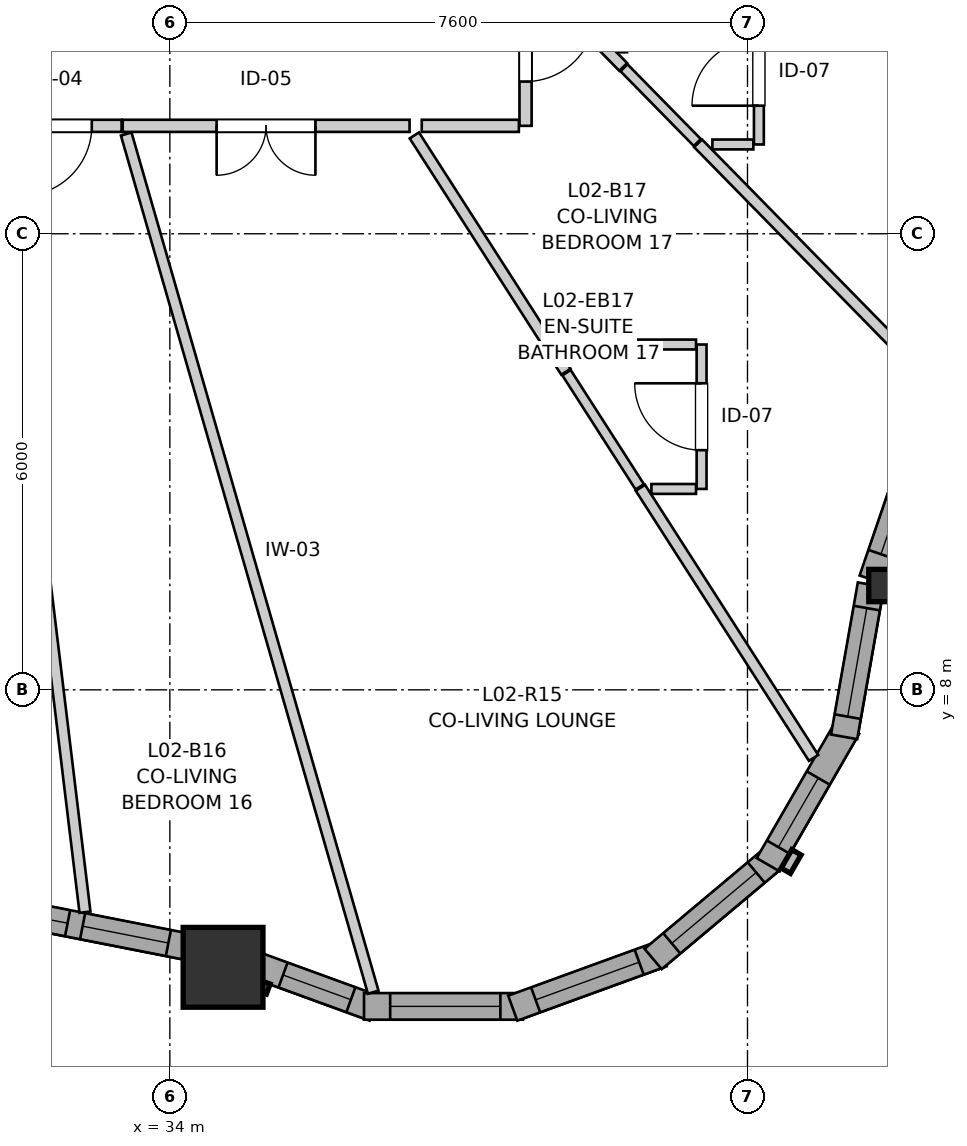
"""IFC4 building model, lengths in metres.
Left out: names, types, materials, properties, quantities, classifications, styles, units other than length and angle.
Written with IfcOpenShell. Run it as: python <this file> out.ifc"""

import sys

from ifc_helpers import new_model, si_unit, direction, frame, frame_2d, origin, origin_2d, place, context, subcontext, project, spatial, rectangle, i_section, extrude, source, transform, mapped, element, fill, save


model = new_model("IFC4")
c1 = context("Model", 3, precision=1e-05, world=origin(), true_north=direction((0.0, 1.0)))
c2 = subcontext(c1, "Body", "Model", "MODEL_VIEW")
j1 = project(units=[si_unit("LENGTHUNIT", "METRE"), si_unit("PLANEANGLEUNIT", "RADIAN")], contexts=[c1])
p1 = place(None, origin())
s1 = spatial("IfcSite", under=j1, at=p1, CompositionType="ELEMENT")
p2 = place(p1, origin())
s2 = spatial("IfcBuilding", under=s1, at=p2, CompositionType="ELEMENT")
p3 = place(p2, frame((0.0, 0.0, 11.0)))
s3 = spatial("IfcBuildingStorey", under=s2, at=p3, CompositionType="ELEMENT", Elevation=11.0)
m1 = source(origin(), c2, "Body", "SweptSolid", [
    extrude(rectangle(XDim=1.05, YDim=1.05, at=origin_2d()), origin(), (0.0, 0.0, 1.0), 2.94),
])
p4 = place(p3, frame((34.7, 4.349, 0.0), z_axis=(0.0, 0.0, 1.0), x_axis=(1.0, 0.0, 0.0)))
e1 = element("IfcColumn", 1, at=p4, inside=s3, PredefinedType="COLUMN", context=c2, shape_type="MappedRepresentation", body=[
    mapped(m1, transform((0.0, 0.0, 0.0), x_axis=(1.0, 0.0, 0.0), y_axis=(0.0, 1.0, 0.0), z_axis=(0.0, 0.0, 1.0), scale=1.0)),
])
m2 = source(origin(), c2, "Body", "SweptSolid", [
    extrude(i_section(OverallWidth=0.409, OverallDepth=0.425, WebThickness=0.03, FlangeThickness=0.048, FilletRadius=0.015, at=origin_2d()), origin(), (0.0, 0.0, 1.0), 2.94),
])
p5 = place(p3, frame((43.4, 9.372, 0.0), z_axis=(0.0, 0.0, 1.0), x_axis=(1.0, 0.0, 0.0)))
e2 = element("IfcColumn", 2, at=p5, inside=s3, PredefinedType="PILASTER", context=c2, shape_type="MappedRepresentation", body=[
    mapped(m2, transform((0.0, 0.0, 0.0), x_axis=(1.0, 0.0, 0.0), y_axis=(0.0, 1.0, 0.0), z_axis=(0.0, 0.0, 1.0), scale=1.0)),
])
p6 = place(p3, frame((31.248, 5.206, 0.0), z_axis=(0.0, 0.0, 1.0), x_axis=(0.981233354077, -0.192824025597, 0.0)))
e3 = element("IfcWall", 3, at=p6, inside=s3, PredefinedType="SOLIDWALL", context=c2, shape_type="SweptSolid", body=[
    extrude(rectangle(XDim=3.253, YDim=0.35, at=frame_2d((1.626, 0.0))), origin(), (0.0, 0.0, 1.0), 2.42),
])
p7 = place(p6, frame((0.284, 0.0, 0.82)))
e4 = element("IfcOpeningElement", 4, at=p7, cuts=e3, PredefinedType="OPENING", context=c2, shape_type="SweptSolid", body=[
    extrude(rectangle(XDim=1.15, YDim=1.2, at=frame_2d((0.575, 0.6))), frame((0.0, 0.185, 0.0), z_axis=(0.0, -1.0, 0.0), x_axis=(1.0, 0.0, 0.0)), (0.0, 0.0, 1.0), 0.37),
])
p8 = place(p6, frame((1.635, 0.0, 0.82)))
e5 = element("IfcOpeningElement", 5, at=p8, cuts=e3, PredefinedType="OPENING", context=c2, shape_type="SweptSolid", body=[
    extrude(rectangle(XDim=1.15, YDim=1.2, at=frame_2d((0.575, 0.6))), frame((0.0, 0.185, 0.0), z_axis=(0.0, -1.0, 0.0), x_axis=(1.0, 0.0, 0.0)), (0.0, 0.0, 1.0), 0.37),
])
p9 = place(p3, frame((35.042, 4.411, 0.0), z_axis=(0.0, 0.0, 1.0), x_axis=(0.9396916908, -0.34202269843, 0.0)))
e6 = element("IfcWall", 6, at=p9, inside=s3, PredefinedType="SOLIDWALL", context=c2, shape_type="SweptSolid", body=[
    extrude(rectangle(XDim=1.752, YDim=0.35, at=frame_2d((0.876, 0.0))), origin(), (0.0, 0.0, 1.0), 2.42),
])
p10 = place(p9, frame((0.476, 0.0, 0.82)))
e7 = element("IfcOpeningElement", 7, at=p10, cuts=e6, PredefinedType="OPENING", context=c2, shape_type="SweptSolid", body=[
    extrude(rectangle(XDim=0.95, YDim=1.35, at=frame_2d((0.475, 0.675))), frame((0.0, 0.185, 0.0), z_axis=(0.0, -1.0, 0.0), x_axis=(1.0, 0.0, 0.0)), (0.0, 0.0, 1.0), 0.37),
])
p11 = place(p3, frame((36.555, 3.835, 0.0), z_axis=(0.0, 0.0, 1.0), x_axis=(1.0, 0.0, 0.0)))
e8 = element("IfcWall", 8, at=p11, inside=s3, PredefinedType="SOLIDWALL", context=c2, shape_type="SweptSolid", body=[
    extrude(rectangle(XDim=2.091, YDim=0.35, at=frame_2d((1.045, 0.0))), origin(), (0.0, 0.0, 1.0), 2.42),
])
p12 = place(p11, frame((0.344, 0.0, 0.82)))
e9 = element("IfcOpeningElement", 9, at=p12, cuts=e8, PredefinedType="OPENING", context=c2, shape_type="SweptSolid", body=[
    extrude(rectangle(XDim=1.45, YDim=1.25, at=frame_2d((0.725, 0.625))), frame((0.0, 0.185, 0.0), z_axis=(0.0, -1.0, 0.0), x_axis=(1.0, 0.0, 0.0)), (0.0, 0.0, 1.0), 0.37),
])
p13 = place(p3, frame((38.512, 3.812, 0.0), z_axis=(0.0, 0.0, 1.0), x_axis=(0.939660353162, 0.342108784886, 0.0)))
e10 = element("IfcWall", 10, at=p13, inside=s3, PredefinedType="SOLIDWALL", context=c2, shape_type="SweptSolid", body=[
    extrude(rectangle(XDim=2.09, YDim=0.35, at=frame_2d((1.045, 0.0))), origin(), (0.0, 0.0, 1.0), 2.42),
])
p14 = place(p13, frame((0.32, 0.0, 0.82)))
e11 = element("IfcOpeningElement", 11, at=p14, cuts=e10, PredefinedType="OPENING", context=c2, shape_type="SweptSolid", body=[
    extrude(rectangle(XDim=1.45, YDim=1.25, at=frame_2d((0.725, 0.625))), frame((0.0, 0.185, 0.0), z_axis=(0.0, -1.0, 0.0), x_axis=(1.0, 0.0, 0.0)), (0.0, 0.0, 1.0), 0.37),
])
p15 = place(p3, frame((40.358, 4.459, 0.0), z_axis=(0.0, 0.0, 1.0), x_axis=(0.766082082368, 0.642742750308, 0.0)))
e12 = element("IfcWall", 12, at=p15, inside=s3, PredefinedType="SOLIDWALL", context=c2, shape_type="SweptSolid", body=[
    extrude(rectangle(XDim=2.09, YDim=0.35, at=frame_2d((1.045, 0.0))), origin(), (0.0, 0.0, 1.0), 2.42),
])
p16 = place(p15, frame((0.32, 0.0, 0.82)))
e13 = element("IfcOpeningElement", 13, at=p16, cuts=e12, PredefinedType="OPENING", context=c2, shape_type="SweptSolid", body=[
    extrude(rectangle(XDim=1.45, YDim=1.25, at=frame_2d((0.725, 0.625))), frame((0.0, 0.185, 0.0), z_axis=(0.0, -1.0, 0.0), x_axis=(1.0, 0.0, 0.0)), (0.0, 0.0, 1.0), 0.37),
])
p17 = place(p3, frame((41.873, 5.699, 0.0), z_axis=(0.0, 0.0, 1.0), x_axis=(0.49990781971, 0.866078617559, 0.0)))
e14 = element("IfcWall", 14, at=p17, inside=s3, PredefinedType="SOLIDWALL", context=c2, shape_type="SweptSolid", body=[
    extrude(rectangle(XDim=2.09, YDim=0.35, at=frame_2d((1.045, 0.0))), origin(), (0.0, 0.0, 1.0), 2.42),
])
p18 = place(p17, frame((0.268, 0.0, 0.82)))
e15 = element("IfcOpeningElement", 15, at=p18, cuts=e14, PredefinedType="OPENING", context=c2, shape_type="SweptSolid", body=[
    extrude(rectangle(XDim=1.05, YDim=1.45, at=frame_2d((0.525, 0.725))), frame((0.0, 0.185, 0.0), z_axis=(0.0, -1.0, 0.0), x_axis=(1.0, 0.0, 0.0)), (0.0, 0.0, 1.0), 0.37),
])
p19 = place(p3, frame((42.871, 7.382, 0.0), z_axis=(0.0, 0.0, 1.0), x_axis=(0.173586593252, 0.984818610021, 0.0)))
e16 = element("IfcWall", 16, at=p19, inside=s3, PredefinedType="SOLIDWALL", context=c2, shape_type="SweptSolid", body=[
    extrude(rectangle(XDim=2.032, YDim=0.35, at=frame_2d((1.016, 0.0))), origin(), (0.0, 0.0, 1.0), 2.42),
])
p20 = place(p19, frame((0.27, 0.0, 0.82)))
e17 = element("IfcOpeningElement", 17, at=p20, cuts=e16, PredefinedType="OPENING", context=c2, shape_type="SweptSolid", body=[
    extrude(rectangle(XDim=1.45, YDim=1.25, at=frame_2d((0.725, 0.625))), frame((0.0, 0.185, 0.0), z_axis=(0.0, -1.0, 0.0), x_axis=(1.0, 0.0, 0.0)), (0.0, 0.0, 1.0), 0.37),
])
p21 = place(p3, frame((43.241, 9.448, 0.0), z_axis=(0.0, 0.0, 1.0), x_axis=(0.323599751171, 0.946194060984, 0.0)))
e18 = element("IfcWall", 18, at=p21, inside=s3, PredefinedType="SOLIDWALL", context=c2, shape_type="SweptSolid", body=[
    extrude(rectangle(XDim=3.532, YDim=0.35, at=frame_2d((1.766, 0.0))), origin(), (0.0, 0.0, 1.0), 2.42),
])
p22 = place(p21, frame((0.356, 0.0, 0.82)))
e19 = element("IfcOpeningElement", 19, at=p22, cuts=e18, PredefinedType="OPENING", context=c2, shape_type="SweptSolid", body=[
    extrude(rectangle(XDim=2.1, YDim=1.4, at=frame_2d((1.05, 0.7))), frame((0.0, 0.185, 0.0), z_axis=(0.0, -1.0, 0.0), x_axis=(1.0, 0.0, 0.0)), (0.0, 0.0, 1.0), 0.37),
])
p23 = place(p3, frame((37.154, 15.42, 0.0), z_axis=(0.0, 0.0, 1.0), x_axis=(-1.0, 0.0, 0.0)))
e20 = element("IfcWall", 20, at=p23, inside=s3, PredefinedType="PARTITIONING", context=c2, shape_type="SweptSolid", body=[
    extrude(rectangle(XDim=3.774, YDim=0.16, at=frame_2d((1.887, 0.0))), origin(), (0.0, 0.0, 1.0), 2.94),
])
p24 = place(p23, frame((1.239, 0.0, 0.0)))
e21 = element("IfcOpeningElement", 21, at=p24, cuts=e20, PredefinedType="OPENING", context=c2, shape_type="SweptSolid", body=[
    extrude(rectangle(XDim=1.3, YDim=2.1, at=frame_2d((0.65, 1.05))), frame((0.0, 0.09, 0.0), z_axis=(0.0, -1.0, 0.0), x_axis=(1.0, 0.0, 0.0)), (0.0, 0.0, 1.0), 0.18),
])
p25 = place(p3, frame((38.68, 17.469, 0.0), z_axis=(0.0, 0.0, 1.0), x_axis=(0.0, -1.0, 0.0)))
e22 = element("IfcWall", 22, at=p25, inside=s3, PredefinedType="PARTITIONING", context=c2, shape_type="SweptSolid", body=[
    extrude(rectangle(XDim=2.049, YDim=0.16, at=frame_2d((1.024, 0.0))), origin(), (0.0, 0.0, 1.0), 2.94),
])
p26 = place(p25, frame((0.546, 0.0, 0.0)))
e23 = element("IfcOpeningElement", 23, at=p26, cuts=e22, PredefinedType="OPENING", context=c2, shape_type="SweptSolid", body=[
    extrude(rectangle(XDim=0.92, YDim=2.1, at=frame_2d((0.46, 1.05))), frame((0.0, 0.09, 0.0), z_axis=(0.0, -1.0, 0.0), x_axis=(1.0, 0.0, 0.0)), (0.0, 0.0, 1.0), 0.18),
])
p27 = place(p3, frame((40.996, 10.643, 0.0), z_axis=(0.0, 0.0, 1.0), x_axis=(0.0, 1.0, 0.0)))
e24 = element("IfcWall", 24, at=p27, inside=s3, PredefinedType="PARTITIONING", context=c2, shape_type="SweptSolid", body=[
    extrude(rectangle(XDim=1.9, YDim=0.13, at=frame_2d((0.95, 0.0))), origin(), (0.0, 0.0, 1.0), 2.94),
])
p28 = place(p27, frame((0.51, 0.0, 0.0)))
e25 = element("IfcOpeningElement", 25, at=p28, cuts=e24, PredefinedType="OPENING", context=c2, shape_type="SweptSolid", body=[
    extrude(rectangle(XDim=0.88, YDim=2.05, at=frame_2d((0.44, 1.025))), frame((0.0, 0.075, 0.0), z_axis=(0.0, -1.0, 0.0), x_axis=(1.0, 0.0, 0.0)), (0.0, 0.0, 1.0), 0.15),
])
p29 = place(p3, frame((41.75, 15.175, 0.0), z_axis=(0.0, 0.0, 1.0), x_axis=(0.0, 1.0, 0.0)))
e26 = element("IfcWall", 26, at=p29, inside=s3, PredefinedType="PARTITIONING", context=c2, shape_type="SweptSolid", body=[
    extrude(rectangle(XDim=1.9, YDim=0.13, at=frame_2d((0.95, 0.0))), origin(), (0.0, 0.0, 1.0), 2.94),
])
p30 = place(p29, frame((0.51, 0.0, 0.0)))
e27 = element("IfcOpeningElement", 27, at=p30, cuts=e26, PredefinedType="OPENING", context=c2, shape_type="SweptSolid", body=[
    extrude(rectangle(XDim=0.88, YDim=2.05, at=frame_2d((0.44, 1.025))), frame((0.0, 0.075, 0.0), z_axis=(0.0, -1.0, 0.0), x_axis=(1.0, 0.0, 0.0)), (0.0, 0.0, 1.0), 0.15),
])
p31 = place(p3, frame((33.365, 15.42, 0.0), z_axis=(0.0, 0.0, 1.0), x_axis=(-1.0, 0.0, 0.0)))
e28 = element("IfcWall", 28, at=p31, inside=s3, PredefinedType="PARTITIONING", context=c2, shape_type="SweptSolid", body=[
    extrude(rectangle(XDim=1.704, YDim=0.16, at=frame_2d((0.852, 0.0))), origin(), (0.0, 0.0, 1.0), 2.94),
])
p32 = place(p31, frame((0.392, 0.0, 0.0)))
e29 = element("IfcOpeningElement", 29, at=p32, cuts=e28, PredefinedType="OPENING", context=c2, shape_type="SweptSolid", body=[
    extrude(rectangle(XDim=0.92, YDim=2.1, at=frame_2d((0.46, 1.05))), frame((0.0, 0.09, 0.0), z_axis=(0.0, -1.0, 0.0), x_axis=(1.0, 0.0, 0.0)), (0.0, 0.0, 1.0), 0.18),
])
p33 = place(p3, frame((33.426, 15.312, 0.0), z_axis=(0.0, 0.0, 1.0), x_axis=(0.276606114731, -0.960983380342, 0.0)))
e30 = element("IfcWall", 30, at=p33, inside=s3, PredefinedType="PARTITIONING", context=c2, shape_type="SweptSolid", body=[
    extrude(rectangle(XDim=11.749, YDim=0.145, at=frame_2d((5.875, 0.0))), origin(), (0.0, 0.0, 1.0), 2.94),
])
p34 = place(p3, frame((31.643, 15.323, 0.0), z_axis=(0.0, 0.0, 1.0), x_axis=(0.120185874717, -0.992751406707, 0.0)))
e31 = element("IfcWall", 31, at=p34, inside=s3, PredefinedType="PARTITIONING", context=c2, shape_type="SweptSolid", body=[
    extrude(rectangle(XDim=10.323, YDim=0.145, at=frame_2d((5.162, 0.0))), origin(), (0.0, 0.0, 1.0), 2.94),
])
p35 = place(p3, frame((40.95, 15.19, 0.0), z_axis=(0.0, 0.0, 1.0), x_axis=(0.700142401903, -0.714003233226, 0.0)))
e32 = element("IfcWall", 32, at=p35, inside=s3, PredefinedType="PARTITIONING", context=c2, shape_type="SweptSolid", body=[
    extrude(rectangle(XDim=4.298, YDim=0.145, at=frame_2d((2.149, 0.0))), origin(), (0.0, 0.0, 1.0), 2.94),
])
p36 = place(p3, frame((40.191, 10.658, 0.0), z_axis=(0.0, 0.0, 1.0), x_axis=(0.539757550566, -0.841820519236, 0.0)))
e33 = element("IfcWall", 33, at=p36, inside=s3, PredefinedType="PARTITIONING", context=c2, shape_type="SweptSolid", body=[
    extrude(rectangle(XDim=4.221, YDim=0.145, at=frame_2d((2.111, 0.0))), origin(), (0.0, 0.0, 1.0), 2.94),
])
p37 = place(p3, frame((37.217, 15.294, 0.0), z_axis=(0.0, 0.0, 1.0), x_axis=(0.539878709929, -0.841742822105, 0.0)))
e34 = element("IfcWall", 34, at=p37, inside=s3, PredefinedType="PARTITIONING", context=c2, shape_type="SweptSolid", body=[
    extrude(rectangle(XDim=3.694, YDim=0.145, at=frame_2d((1.847, 0.0))), origin(), (0.0, 0.0, 1.0), 2.94),
])
p38 = place(p3, frame((38.817, 17.365, 0.0), z_axis=(0.0, 0.0, 1.0), x_axis=(0.70029627305, -0.713852316626, 0.0)))
e35 = element("IfcWall", 35, at=p38, inside=s3, PredefinedType="PARTITIONING", context=c2, shape_type="SweptSolid", body=[
    extrude(rectangle(XDim=1.639, YDim=0.145, at=frame_2d((0.819, 0.0))), origin(), (0.0, 0.0, 1.0), 2.94),
])
p39 = place(p3, frame((39.196, 12.543, 0.0), z_axis=(0.0, 0.0, 1.0), x_axis=(1.0, 0.0, 0.0)))
e36 = element("IfcWall", 36, at=p39, inside=s3, PredefinedType="PARTITIONING", context=c2, shape_type="SweptSolid", body=[
    extrude(rectangle(XDim=1.727, YDim=0.13, at=frame_2d((0.864, 0.0))), origin(), (0.0, 0.0, 1.0), 2.94),
])
p40 = place(p3, frame((39.219, 12.172, 0.0), z_axis=(0.0, 0.0, 1.0), x_axis=(0.539899826285, -0.84172927808, 0.0)))
e37 = element("IfcWall", 37, at=p40, inside=s3, PredefinedType="PARTITIONING", context=c2, shape_type="SweptSolid", body=[
    extrude(rectangle(XDim=1.784, YDim=0.13, at=frame_2d((0.892, 0.0))), origin(), (0.0, 0.0, 1.0), 2.94),
])
p41 = place(p3, frame((37.314, 15.42, 0.0), z_axis=(0.0, 0.0, 1.0), x_axis=(1.0, 0.0, 0.0)))
e38 = element("IfcWall", 38, at=p41, inside=s3, PredefinedType="PARTITIONING", context=c2, shape_type="SweptSolid", body=[
    extrude(rectangle(XDim=1.278, YDim=0.16, at=frame_2d((0.639, 0.0))), origin(), (0.0, 0.0, 1.0), 2.94),
])
p42 = place(p3, frame((39.975, 16.184, 0.0), z_axis=(0.0, 0.0, 1.0), x_axis=(0.700338966049, -0.713810431861, 0.0)))
e39 = element("IfcWall", 39, at=p42, inside=s3, PredefinedType="PARTITIONING", context=c2, shape_type="SweptSolid", body=[
    extrude(rectangle(XDim=1.377, YDim=0.13, at=frame_2d((0.689, 0.0))), origin(), (0.0, 0.0, 1.0), 2.94),
])
p43 = place(p3, frame((40.336, 10.643, 0.0), z_axis=(0.0, 0.0, 1.0), x_axis=(1.0, 0.0, 0.0)))
e40 = element("IfcWall", 40, at=p43, inside=s3, PredefinedType="PARTITIONING", context=c2, shape_type="SweptSolid", body=[
    extrude(rectangle(XDim=0.587, YDim=0.13, at=frame_2d((0.294, 0.0))), origin(), (0.0, 0.0, 1.0), 2.94),
])
p44 = place(p3, frame((41.138, 15.175, 0.0), z_axis=(0.0, 0.0, 1.0), x_axis=(1.0, 0.0, 0.0)))
e41 = element("IfcWall", 41, at=p44, inside=s3, PredefinedType="PARTITIONING", context=c2, shape_type="SweptSolid", body=[
    extrude(rectangle(XDim=0.539, YDim=0.13, at=frame_2d((0.27, 0.0))), origin(), (0.0, 0.0, 1.0), 2.94),
])
m3 = source(origin(), c2, "Body", "SweptSolid", [
    extrude(rectangle(XDim=1.15, YDim=1.2, at=frame_2d((0.575, 0.6))), frame((0.0, 0.03, 0.0), z_axis=(0.0, -1.0, 0.0), x_axis=(1.0, 0.0, 0.0)), (0.0, 0.0, 1.0), 0.06),
])
p45 = place(p7, origin())
e42 = element("IfcWindow", 42, at=p45, inside=s3, PartitioningType="SINGLE_PANEL", PredefinedType="WINDOW", context=c2, shape_type="MappedRepresentation", body=[
    mapped(m3, transform((0.0, 0.0, 0.0), x_axis=(1.0, 0.0, 0.0), y_axis=(0.0, 1.0, 0.0), z_axis=(0.0, 0.0, 1.0), scale=1.0)),
])
fill(e4, e42)
p46 = place(p8, origin())
e43 = element("IfcWindow", 43, at=p46, inside=s3, PartitioningType="SINGLE_PANEL", PredefinedType="WINDOW", context=c2, shape_type="MappedRepresentation", body=[
    mapped(m3, transform((0.0, 0.0, 0.0), x_axis=(1.0, 0.0, 0.0), y_axis=(0.0, 1.0, 0.0), z_axis=(0.0, 0.0, 1.0), scale=1.0)),
])
fill(e5, e43)
m4 = source(origin(), c2, "Body", "SweptSolid", [
    extrude(rectangle(XDim=0.95, YDim=1.35, at=frame_2d((0.475, 0.675))), frame((0.0, 0.03, 0.0), z_axis=(0.0, -1.0, 0.0), x_axis=(1.0, 0.0, 0.0)), (0.0, 0.0, 1.0), 0.06),
])
p47 = place(p10, origin())
e44 = element("IfcWindow", 44, at=p47, inside=s3, PartitioningType="SINGLE_PANEL", PredefinedType="WINDOW", context=c2, shape_type="MappedRepresentation", body=[
    mapped(m4, transform((0.0, 0.0, 0.0), x_axis=(1.0, 0.0, 0.0), y_axis=(0.0, 1.0, 0.0), z_axis=(0.0, 0.0, 1.0), scale=1.0)),
])
fill(e7, e44)
m5 = source(origin(), c2, "Body", "SweptSolid", [
    extrude(rectangle(XDim=1.45, YDim=1.25, at=frame_2d((0.725, 0.625))), frame((0.0, 0.03, 0.0), z_axis=(0.0, -1.0, 0.0), x_axis=(1.0, 0.0, 0.0)), (0.0, 0.0, 1.0), 0.06),
])
p48 = place(p12, origin())
e45 = element("IfcWindow", 45, at=p48, inside=s3, PartitioningType="SINGLE_PANEL", PredefinedType="WINDOW", context=c2, shape_type="MappedRepresentation", body=[
    mapped(m5, transform((0.0, 0.0, 0.0), x_axis=(1.0, 0.0, 0.0), y_axis=(0.0, 1.0, 0.0), z_axis=(0.0, 0.0, 1.0), scale=1.0)),
])
fill(e9, e45)
p49 = place(p14, origin())
e46 = element("IfcWindow", 46, at=p49, inside=s3, PartitioningType="SINGLE_PANEL", PredefinedType="WINDOW", context=c2, shape_type="MappedRepresentation", body=[
    mapped(m5, transform((0.0, 0.0, 0.0), x_axis=(1.0, 0.0, 0.0), y_axis=(0.0, 1.0, 0.0), z_axis=(0.0, 0.0, 1.0), scale=1.0)),
])
fill(e11, e46)
p50 = place(p16, origin())
e47 = element("IfcWindow", 47, at=p50, inside=s3, PartitioningType="SINGLE_PANEL", PredefinedType="WINDOW", context=c2, shape_type="MappedRepresentation", body=[
    mapped(m5, transform((0.0, 0.0, 0.0), x_axis=(1.0, 0.0, 0.0), y_axis=(0.0, 1.0, 0.0), z_axis=(0.0, 0.0, 1.0), scale=1.0)),
])
fill(e13, e47)
m6 = source(origin(), c2, "Body", "SweptSolid", [
    extrude(rectangle(XDim=1.05, YDim=1.45, at=frame_2d((0.525, 0.725))), frame((0.0, 0.03, 0.0), z_axis=(0.0, -1.0, 0.0), x_axis=(1.0, 0.0, 0.0)), (0.0, 0.0, 1.0), 0.06),
])
p51 = place(p18, origin())
e48 = element("IfcWindow", 48, at=p51, inside=s3, PartitioningType="SINGLE_PANEL", PredefinedType="WINDOW", context=c2, shape_type="MappedRepresentation", body=[
    mapped(m6, transform((0.0, 0.0, 0.0), x_axis=(1.0, 0.0, 0.0), y_axis=(0.0, 1.0, 0.0), z_axis=(0.0, 0.0, 1.0), scale=1.0)),
])
fill(e15, e48)
p52 = place(p20, origin())
e49 = element("IfcWindow", 49, at=p52, inside=s3, PartitioningType="SINGLE_PANEL", PredefinedType="WINDOW", context=c2, shape_type="MappedRepresentation", body=[
    mapped(m5, transform((0.0, 0.0, 0.0), x_axis=(1.0, 0.0, 0.0), y_axis=(0.0, 1.0, 0.0), z_axis=(0.0, 0.0, 1.0), scale=1.0)),
])
fill(e17, e49)
m7 = source(origin(), c2, "Body", "SweptSolid", [
    extrude(rectangle(XDim=2.1, YDim=1.4, at=frame_2d((1.05, 0.7))), frame((0.0, 0.03, 0.0), z_axis=(0.0, -1.0, 0.0), x_axis=(1.0, 0.0, 0.0)), (0.0, 0.0, 1.0), 0.06),
])
p53 = place(p22, origin())
e50 = element("IfcWindow", 50, at=p53, inside=s3, PartitioningType="SINGLE_PANEL", PredefinedType="WINDOW", context=c2, shape_type="MappedRepresentation", body=[
    mapped(m7, transform((0.0, 0.0, 0.0), x_axis=(1.0, 0.0, 0.0), y_axis=(0.0, 1.0, 0.0), z_axis=(0.0, 0.0, 1.0), scale=1.0)),
])
fill(e19, e50)
m8 = source(origin(), c2, "Body", "SweptSolid", [
    extrude(rectangle(XDim=1.3, YDim=2.1, at=frame_2d((0.65, 1.05))), frame((0.0, 0.025, 0.0), z_axis=(0.0, -1.0, 0.0), x_axis=(1.0, 0.0, 0.0)), (0.0, 0.0, 1.0), 0.05),
])
p54 = place(p24, origin())
e51 = element("IfcDoor", 51, at=p54, inside=s3, OperationType="DOUBLE_DOOR_SINGLE_SWING", PredefinedType="DOOR", context=c2, shape_type="MappedRepresentation", body=[
    mapped(m8, transform((0.0, 0.0, 0.0), x_axis=(1.0, 0.0, 0.0), y_axis=(0.0, 1.0, 0.0), z_axis=(0.0, 0.0, 1.0), scale=1.0)),
])
fill(e21, e51)
m9 = source(origin(), c2, "Body", "SweptSolid", [
    extrude(rectangle(XDim=0.92, YDim=2.1, at=frame_2d((0.46, 1.05))), frame((0.0, 0.025, 0.0), z_axis=(0.0, -1.0, 0.0), x_axis=(1.0, 0.0, 0.0)), (0.0, 0.0, 1.0), 0.05),
])
p55 = place(p26, origin())
e52 = element("IfcDoor", 52, at=p55, inside=s3, OperationType="SINGLE_SWING_LEFT", PredefinedType="DOOR", context=c2, shape_type="MappedRepresentation", body=[
    mapped(m9, transform((0.0, 0.0, 0.0), x_axis=(1.0, 0.0, 0.0), y_axis=(0.0, 1.0, 0.0), z_axis=(0.0, 0.0, 1.0), scale=1.0)),
])
fill(e23, e52)
m10 = source(origin(), c2, "Body", "SweptSolid", [
    extrude(rectangle(XDim=0.88, YDim=2.05, at=frame_2d((0.44, 1.025))), frame((0.0, 0.025, 0.0), z_axis=(0.0, -1.0, 0.0), x_axis=(1.0, 0.0, 0.0)), (0.0, 0.0, 1.0), 0.05),
])
p56 = place(p28, origin())
e53 = element("IfcDoor", 53, at=p56, inside=s3, OperationType="SINGLE_SWING_RIGHT", PredefinedType="DOOR", context=c2, shape_type="MappedRepresentation", body=[
    mapped(m10, transform((0.0, 0.0, 0.0), x_axis=(1.0, 0.0, 0.0), y_axis=(0.0, 1.0, 0.0), z_axis=(0.0, 0.0, 1.0), scale=1.0)),
])
fill(e25, e53)
p57 = place(p30, origin())
e54 = element("IfcDoor", 54, at=p57, inside=s3, OperationType="SINGLE_SWING_LEFT", PredefinedType="DOOR", context=c2, shape_type="MappedRepresentation", body=[
    mapped(m10, transform((0.0, 0.0, 0.0), x_axis=(1.0, 0.0, 0.0), y_axis=(0.0, 1.0, 0.0), z_axis=(0.0, 0.0, 1.0), scale=1.0)),
])
fill(e27, e54)
p58 = place(p32, origin())
e55 = element("IfcDoor", 55, at=p58, inside=s3, OperationType="SINGLE_SWING_RIGHT", PredefinedType="DOOR", context=c2, shape_type="MappedRepresentation", body=[
    mapped(m9, transform((0.0, 0.0, 0.0), x_axis=(1.0, 0.0, 0.0), y_axis=(0.0, 1.0, 0.0), z_axis=(0.0, 0.0, 1.0), scale=1.0)),
])
fill(e29, e55)
save(model, sys.argv[1])
